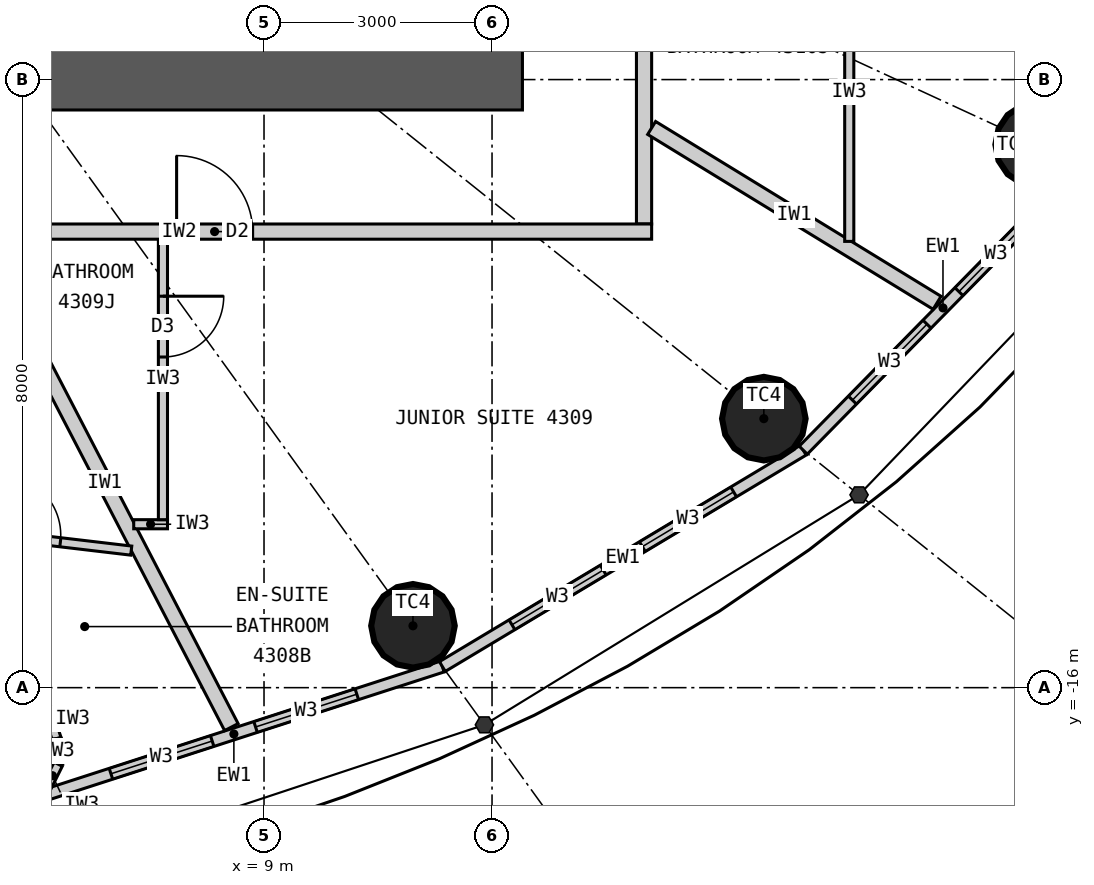
"""IFC4 building model, lengths in metres.
Left out: names, types, materials, properties, quantities, classifications, styles, units other than length and angle.
Written with IfcOpenShell. Run it as: python <this file> out.ifc"""

import sys

from ifc_helpers import new_model, si_unit, direction, frame, frame_2d, origin, origin_2d, place, context, subcontext, project, spatial, rectangle, circle, extrude, element, fill, save


model = new_model("IFC4")
c1 = context("Model", 3, precision=1e-05, world=origin(), true_north=direction((0.0, 1.0)))
c2 = subcontext(c1, "Body", "Model", "MODEL_VIEW")
j1 = project(units=[si_unit("LENGTHUNIT", "METRE"), si_unit("PLANEANGLEUNIT", "RADIAN")], contexts=[c1])
p1 = place(None, origin())
s1 = spatial("IfcSite", under=j1, at=p1, CompositionType="ELEMENT")
p2 = place(p1, origin())
s2 = spatial("IfcBuilding", under=s1, at=p2, CompositionType="ELEMENT")
p3 = place(p2, frame((0.0, 0.0, 163.2)))
s3 = spatial("IfcBuildingStorey", under=s2, at=p3, CompositionType="ELEMENT", Elevation=163.2)
for number, where, z_axis, x_axis in (
    (1, (10.96, -15.186, 0.0), (0.0, 0.0, 1.0), (1.0, 0.0, 0.0)),
    (2, (15.576, -12.461, 0.0), (0.0, 0.0, 1.0), (1.0, 0.0, 0.0)),
    (3, (19.172, -8.855, 0.0), (0.0, 0.0, 1.0), (1.0, 0.0, 0.0)),
):
    element("IfcColumn", number, at=place(p3, frame(where, z_axis=z_axis, x_axis=x_axis)), inside=s3, PredefinedType="COLUMN", context=c2, shape_type="SweptSolid", body=[
        extrude(circle(Radius=0.55, at=origin_2d()), origin(), (0.0, 0.0, 1.0), 3.3),
    ])
p4 = place(p3, frame((12.4, -8.0, 0.0), z_axis=(0.0, 0.0, 1.0), x_axis=(-1.0, 0.0, 0.0)))
e4 = element("IfcWall", 4, at=p4, inside=s3, PredefinedType="SHEAR", context=c2, shape_type="SweptSolid", body=[
    extrude(rectangle(XDim=24.8, YDim=0.8, at=frame_2d((12.4, 0.0))), origin(), (0.0, 0.0, 1.0), 3.3),
])
p5 = place(p4, frame((11.1, 0.0, 0.0)))
e5 = element("IfcOpeningElement", 5, at=p5, cuts=e4, PredefinedType="OPENING", context=c2, shape_type="SweptSolid", body=[
    extrude(rectangle(XDim=1.2, YDim=2.2, at=frame_2d((0.6, 1.1))), frame((0.0, 0.41, 0.0), z_axis=(0.0, -1.0, 0.0), x_axis=(1.0, 0.0, 0.0)), (0.0, 0.0, 1.0), 0.82),
])
p6 = place(p4, frame((18.7, 0.0, 0.0)))
e6 = element("IfcOpeningElement", 6, at=p6, cuts=e4, PredefinedType="OPENING", context=c2, shape_type="SweptSolid", body=[
    extrude(rectangle(XDim=0.9, YDim=2.2, at=frame_2d((0.45, 1.1))), frame((0.0, 0.41, 0.0), z_axis=(0.0, -1.0, 0.0), x_axis=(1.0, 0.0, 0.0)), (0.0, 0.0, 1.0), 0.82),
])
p7 = place(p3, frame((5.86, -17.497, 0.0), z_axis=(0.0, 0.0, 1.0), x_axis=(0.951432482129, 0.307857486429, 0.0)))
e7 = element("IfcWall", 7, at=p7, inside=s3, PredefinedType="ELEMENTEDWALL", context=c2, shape_type="SweptSolid", body=[
    extrude(rectangle(XDim=5.766, YDim=0.15, at=frame_2d((2.883, 0.0))), origin(), (0.0, 0.0, 1.0), 3.12),
])
p8 = place(p7, frame((1.183, 0.0, 0.9)))
e8 = element("IfcOpeningElement", 8, at=p8, cuts=e7, PredefinedType="OPENING", context=c2, shape_type="SweptSolid", body=[
    extrude(rectangle(XDim=1.4, YDim=1.9, at=frame_2d((0.7, 0.95))), frame((0.0, 0.085, 0.0), z_axis=(0.0, -1.0, 0.0), x_axis=(1.0, 0.0, 0.0)), (0.0, 0.0, 1.0), 0.17),
])
p9 = place(p7, frame((3.183, 0.0, 0.9)))
e9 = element("IfcOpeningElement", 9, at=p9, cuts=e7, PredefinedType="OPENING", context=c2, shape_type="SweptSolid", body=[
    extrude(rectangle(XDim=1.4, YDim=1.9, at=frame_2d((0.7, 0.95))), frame((0.0, 0.085, 0.0), z_axis=(0.0, -1.0, 0.0), x_axis=(1.0, 0.0, 0.0)), (0.0, 0.0, 1.0), 0.17),
])
p10 = place(p3, frame((11.346, -15.722, 0.0), z_axis=(0.0, 0.0, 1.0), x_axis=(0.857695199231, 0.514158482587, 0.0)))
e10 = element("IfcWall", 10, at=p10, inside=s3, PredefinedType="ELEMENTEDWALL", context=c2, shape_type="SweptSolid", body=[
    extrude(rectangle(XDim=5.536, YDim=0.15, at=frame_2d((2.768, 0.0))), origin(), (0.0, 0.0, 1.0), 3.12),
])
p11 = place(p10, frame((1.068, 0.0, 0.9)))
e11 = element("IfcOpeningElement", 11, at=p11, cuts=e10, PredefinedType="OPENING", context=c2, shape_type="SweptSolid", body=[
    extrude(rectangle(XDim=1.4, YDim=1.9, at=frame_2d((0.7, 0.95))), frame((0.0, 0.085, 0.0), z_axis=(0.0, -1.0, 0.0), x_axis=(1.0, 0.0, 0.0)), (0.0, 0.0, 1.0), 0.17),
])
p12 = place(p10, frame((3.068, 0.0, 0.9)))
e12 = element("IfcOpeningElement", 12, at=p12, cuts=e10, PredefinedType="OPENING", context=c2, shape_type="SweptSolid", body=[
    extrude(rectangle(XDim=1.4, YDim=1.9, at=frame_2d((0.7, 0.95))), frame((0.0, 0.085, 0.0), z_axis=(0.0, -1.0, 0.0), x_axis=(1.0, 0.0, 0.0)), (0.0, 0.0, 1.0), 0.17),
])
p13 = place(p3, frame((16.095, -12.876, 0.0), z_axis=(0.0, 0.0, 1.0), x_axis=(0.700727467776, 0.71342905457, 0.0)))
e13 = element("IfcWall", 13, at=p13, inside=s3, PredefinedType="ELEMENTEDWALL", context=c2, shape_type="SweptSolid", body=[
    extrude(rectangle(XDim=5.247, YDim=0.15, at=frame_2d((2.624, 0.0))), origin(), (0.0, 0.0, 1.0), 3.12),
])
p14 = place(p13, frame((0.924, 0.0, 0.9)))
e14 = element("IfcOpeningElement", 14, at=p14, cuts=e13, PredefinedType="OPENING", context=c2, shape_type="SweptSolid", body=[
    extrude(rectangle(XDim=1.4, YDim=1.9, at=frame_2d((0.7, 0.95))), frame((0.0, 0.085, 0.0), z_axis=(0.0, -1.0, 0.0), x_axis=(1.0, 0.0, 0.0)), (0.0, 0.0, 1.0), 0.17),
])
p15 = place(p13, frame((2.924, 0.0, 0.9)))
e15 = element("IfcOpeningElement", 15, at=p15, cuts=e13, PredefinedType="OPENING", context=c2, shape_type="SweptSolid", body=[
    extrude(rectangle(XDim=1.4, YDim=1.9, at=frame_2d((0.7, 0.95))), frame((0.0, 0.085, 0.0), z_axis=(0.0, -1.0, 0.0), x_axis=(1.0, 0.0, 0.0)), (0.0, 0.0, 1.0), 0.17),
])
p16 = place(p3, frame((14.0, -9.9, 0.0), z_axis=(0.0, 0.0, 1.0), x_axis=(0.0, 1.0, 0.0)))
e16 = element("IfcWall", 16, at=p16, inside=s3, PredefinedType="PARTITIONING", context=c2, shape_type="SweptSolid", body=[
    extrude(rectangle(XDim=19.8, YDim=0.2, at=frame_2d((9.9, 0.0))), origin(), (0.0, 0.0, 1.0), 3.12),
])
p17 = place(p16, frame((3.824, 0.0, 0.0)))
e17 = element("IfcOpeningElement", 17, at=p17, cuts=e16, PredefinedType="OPENING", context=c2, shape_type="SweptSolid", body=[
    extrude(rectangle(XDim=1.0, YDim=2.2, at=frame_2d((0.5, 1.1))), frame((0.0, 0.11, 0.0), z_axis=(0.0, -1.0, 0.0), x_axis=(1.0, 0.0, 0.0)), (0.0, 0.0, 1.0), 0.22),
])
p18 = place(p16, frame((8.719, 0.0, 0.0)))
e18 = element("IfcOpeningElement", 18, at=p18, cuts=e16, PredefinedType="OPENING", context=c2, shape_type="SweptSolid", body=[
    extrude(rectangle(XDim=1.0, YDim=2.2, at=frame_2d((0.5, 1.1))), frame((0.0, 0.11, 0.0), z_axis=(0.0, -1.0, 0.0), x_axis=(1.0, 0.0, 0.0)), (0.0, 0.0, 1.0), 0.22),
])
p19 = place(p16, frame((15.482, 0.0, 0.0)))
e19 = element("IfcOpeningElement", 19, at=p19, cuts=e16, PredefinedType="OPENING", context=c2, shape_type="SweptSolid", body=[
    extrude(rectangle(XDim=1.0, YDim=2.2, at=frame_2d((0.5, 1.1))), frame((0.0, 0.11, 0.0), z_axis=(0.0, -1.0, 0.0), x_axis=(1.0, 0.0, 0.0)), (0.0, 0.0, 1.0), 0.22),
])
p20 = place(p3, frame((5.24, -10.1, 0.0), z_axis=(0.0, 0.0, 1.0), x_axis=(0.460532965373, -0.887642601391, 0.0)))
e20 = element("IfcWall", 20, at=p20, inside=s3, PredefinedType="PARTITIONING", context=c2, shape_type="SweptSolid", body=[
    extrude(rectangle(XDim=7.231, YDim=0.2, at=frame_2d((3.616, 0.0))), origin(), (0.0, 0.0, 1.0), 3.12),
])
p21 = place(p3, frame((14.1, -8.636, 0.0), z_axis=(0.0, 0.0, 1.0), x_axis=(0.852731884196, -0.522348862041, 0.0)))
e21 = element("IfcWall", 21, at=p21, inside=s3, PredefinedType="PARTITIONING", context=c2, shape_type="SweptSolid", body=[
    extrude(rectangle(XDim=4.404, YDim=0.2, at=frame_2d((2.202, 0.0))), origin(), (0.0, 0.0, 1.0), 3.12),
])
p22 = place(p3, frame((7.253, -14.197, 0.0), z_axis=(0.0, 0.0, 1.0), x_axis=(-0.993128188393, 0.117031625725, 0.0)))
e22 = element("IfcWall", 22, at=p22, inside=s3, PredefinedType="PARTITIONING", context=c2, shape_type="SweptSolid", body=[
    extrude(rectangle(XDim=2.678, YDim=0.12, at=frame_2d((1.339, 0.0))), origin(), (0.0, 0.0, 1.0), 3.12),
])
p23 = place(p22, frame((0.939, 0.0, 0.0)))
e23 = element("IfcOpeningElement", 23, at=p23, cuts=e22, PredefinedType="OPENING", context=c2, shape_type="SweptSolid", body=[
    extrude(rectangle(XDim=0.8, YDim=2.1, at=frame_2d((0.4, 1.05))), frame((0.0, 0.07, 0.0), z_axis=(0.0, -1.0, 0.0), x_axis=(1.0, 0.0, 0.0)), (0.0, 0.0, 1.0), 0.14),
])
p24 = place(p3, frame((6.097, -16.149, 0.0), z_axis=(0.0, 0.0, 1.0), x_axis=(0.317292604854, -0.948327687514, 0.0)))
e24 = element("IfcWall", 24, at=p24, inside=s3, PredefinedType="PARTITIONING", context=c2, shape_type="SweptSolid", body=[
    extrude(rectangle(XDim=0.55, YDim=0.12, at=frame_2d((0.275, 0.0))), origin(), (0.0, 0.0, 1.0), 3.12),
])
for number, where, z_axis, x_axis in (
    (25, (6.271, -16.67, 0.0), (0.0, 0.0, 1.0), (0.061, -0.998, 0.0)),
    (26, (6.292, -17.007, 0.0), (0.0, 0.0, 1.0), (-0.445, -0.895, 0.0)),
):
    element("IfcWall", number, at=place(p3, frame(where, z_axis=z_axis, x_axis=x_axis)), inside=s3, PredefinedType="PARTITIONING", context=c2, shape_type="SweptSolid", body=[
        extrude(rectangle(XDim=0.338, YDim=0.12, at=frame_2d((0.169, 0.0))), origin(), (0.0, 0.0, 1.0), 3.12),
    ])
p25 = place(p3, frame((7.286, -13.85, 0.0), z_axis=(0.0, 0.0, 1.0), x_axis=(1.0, 0.0, 0.0)))
e27 = element("IfcWall", 27, at=p25, inside=s3, PredefinedType="PARTITIONING", context=c2, shape_type="SweptSolid", body=[
    extrude(rectangle(XDim=0.444, YDim=0.12, at=frame_2d((0.222, 0.0))), origin(), (0.0, 0.0, 1.0), 3.12),
])
p26 = place(p3, frame((7.67, -10.1, 0.0), z_axis=(0.0, 0.0, 1.0), x_axis=(0.0, -1.0, 0.0)))
e28 = element("IfcWall", 28, at=p26, inside=s3, PredefinedType="PARTITIONING", context=c2, shape_type="SweptSolid", body=[
    extrude(rectangle(XDim=3.69, YDim=0.12, at=frame_2d((1.845, 0.0))), origin(), (0.0, 0.0, 1.0), 3.12),
])
p27 = place(p26, frame((0.75, 0.0, 0.0)))
e29 = element("IfcOpeningElement", 29, at=p27, cuts=e28, PredefinedType="OPENING", context=c2, shape_type="SweptSolid", body=[
    extrude(rectangle(XDim=0.8, YDim=2.1, at=frame_2d((0.4, 1.05))), frame((0.0, 0.07, 0.0), z_axis=(0.0, -1.0, 0.0), x_axis=(1.0, 0.0, 0.0)), (0.0, 0.0, 1.0), 0.14),
])
p28 = place(p3, frame((16.7, -10.129, 0.0), z_axis=(0.0, 0.0, 1.0), x_axis=(0.0, 1.0, 0.0)))
e30 = element("IfcWall", 30, at=p28, inside=s3, PredefinedType="PARTITIONING", context=c2, shape_type="SweptSolid", body=[
    extrude(rectangle(XDim=3.933, YDim=0.12, at=frame_2d((1.966, 0.0))), origin(), (0.0, 0.0, 1.0), 3.12),
])
p29 = place(p3, frame((14.1, -10.0, 0.0), z_axis=(0.0, 0.0, 1.0), x_axis=(-1.0, 0.0, 0.0)))
e31 = element("IfcWall", 31, at=p29, inside=s3, PredefinedType="PARTITIONING", context=c2, shape_type="SweptSolid", body=[
    extrude(rectangle(XDim=12.43, YDim=0.2, at=frame_2d((6.215, 0.0))), origin(), (0.0, 0.0, 1.0), 3.12),
])
p30 = place(p29, frame((5.25, 0.0, 0.0)))
e32 = element("IfcOpeningElement", 32, at=p30, cuts=e31, PredefinedType="OPENING", context=c2, shape_type="SweptSolid", body=[
    extrude(rectangle(XDim=1.0, YDim=2.2, at=frame_2d((0.5, 1.1))), frame((0.0, 0.11, 0.0), z_axis=(0.0, -1.0, 0.0), x_axis=(1.0, 0.0, 0.0)), (0.0, 0.0, 1.0), 0.22),
])
p31 = place(p8, origin())
e33 = element("IfcWindow", 33, at=p31, inside=s3, PartitioningType="SINGLE_PANEL", PredefinedType="WINDOW", context=c2, shape_type="SweptSolid", body=[
    extrude(rectangle(XDim=1.4, YDim=1.9, at=frame_2d((0.7, 0.95))), frame((0.0, 0.03, 0.0), z_axis=(0.0, -1.0, 0.0), x_axis=(1.0, 0.0, 0.0)), (0.0, 0.0, 1.0), 0.06),
])
fill(e8, e33)
p32 = place(p9, origin())
e34 = element("IfcWindow", 34, at=p32, inside=s3, PartitioningType="SINGLE_PANEL", PredefinedType="WINDOW", context=c2, shape_type="SweptSolid", body=[
    extrude(rectangle(XDim=1.4, YDim=1.9, at=frame_2d((0.7, 0.95))), frame((0.0, 0.03, 0.0), z_axis=(0.0, -1.0, 0.0), x_axis=(1.0, 0.0, 0.0)), (0.0, 0.0, 1.0), 0.06),
])
fill(e9, e34)
p33 = place(p11, origin())
e35 = element("IfcWindow", 35, at=p33, inside=s3, PartitioningType="SINGLE_PANEL", PredefinedType="WINDOW", context=c2, shape_type="SweptSolid", body=[
    extrude(rectangle(XDim=1.4, YDim=1.9, at=frame_2d((0.7, 0.95))), frame((0.0, 0.03, 0.0), z_axis=(0.0, -1.0, 0.0), x_axis=(1.0, 0.0, 0.0)), (0.0, 0.0, 1.0), 0.06),
])
fill(e11, e35)
p34 = place(p12, origin())
e36 = element("IfcWindow", 36, at=p34, inside=s3, PartitioningType="SINGLE_PANEL", PredefinedType="WINDOW", context=c2, shape_type="SweptSolid", body=[
    extrude(rectangle(XDim=1.4, YDim=1.9, at=frame_2d((0.7, 0.95))), frame((0.0, 0.03, 0.0), z_axis=(0.0, -1.0, 0.0), x_axis=(1.0, 0.0, 0.0)), (0.0, 0.0, 1.0), 0.06),
])
fill(e12, e36)
p35 = place(p14, origin())
e37 = element("IfcWindow", 37, at=p35, inside=s3, PartitioningType="SINGLE_PANEL", PredefinedType="WINDOW", context=c2, shape_type="SweptSolid", body=[
    extrude(rectangle(XDim=1.4, YDim=1.9, at=frame_2d((0.7, 0.95))), frame((0.0, 0.03, 0.0), z_axis=(0.0, -1.0, 0.0), x_axis=(1.0, 0.0, 0.0)), (0.0, 0.0, 1.0), 0.06),
])
fill(e14, e37)
p36 = place(p15, origin())
e38 = element("IfcWindow", 38, at=p36, inside=s3, PartitioningType="SINGLE_PANEL", PredefinedType="WINDOW", context=c2, shape_type="SweptSolid", body=[
    extrude(rectangle(XDim=1.4, YDim=1.9, at=frame_2d((0.7, 0.95))), frame((0.0, 0.03, 0.0), z_axis=(0.0, -1.0, 0.0), x_axis=(1.0, 0.0, 0.0)), (0.0, 0.0, 1.0), 0.06),
])
fill(e15, e38)
p37 = place(p23, origin())
e39 = element("IfcDoor", 39, at=p37, inside=s3, OperationType="SINGLE_SWING_RIGHT", PredefinedType="DOOR", context=c2, shape_type="SweptSolid", body=[
    extrude(rectangle(XDim=0.8, YDim=2.1, at=frame_2d((0.4, 1.05))), frame((0.0, 0.025, 0.0), z_axis=(0.0, -1.0, 0.0), x_axis=(1.0, 0.0, 0.0)), (0.0, 0.0, 1.0), 0.05),
])
fill(e23, e39)
p38 = place(p27, origin())
e40 = element("IfcDoor", 40, at=p38, inside=s3, OperationType="SINGLE_SWING_LEFT", PredefinedType="DOOR", context=c2, shape_type="SweptSolid", body=[
    extrude(rectangle(XDim=0.8, YDim=2.1, at=frame_2d((0.4, 1.05))), frame((0.0, 0.025, 0.0), z_axis=(0.0, -1.0, 0.0), x_axis=(1.0, 0.0, 0.0)), (0.0, 0.0, 1.0), 0.05),
])
fill(e29, e40)
p39 = place(p30, origin())
e41 = element("IfcDoor", 41, at=p39, inside=s3, OperationType="SINGLE_SWING_RIGHT", PredefinedType="DOOR", context=c2, shape_type="SweptSolid", body=[
    extrude(rectangle(XDim=1.0, YDim=2.2, at=frame_2d((0.5, 1.1))), frame((0.0, 0.025, 0.0), z_axis=(0.0, -1.0, 0.0), x_axis=(1.0, 0.0, 0.0)), (0.0, 0.0, 1.0), 0.05),
])
fill(e32, e41)
save(model, sys.argv[1])
